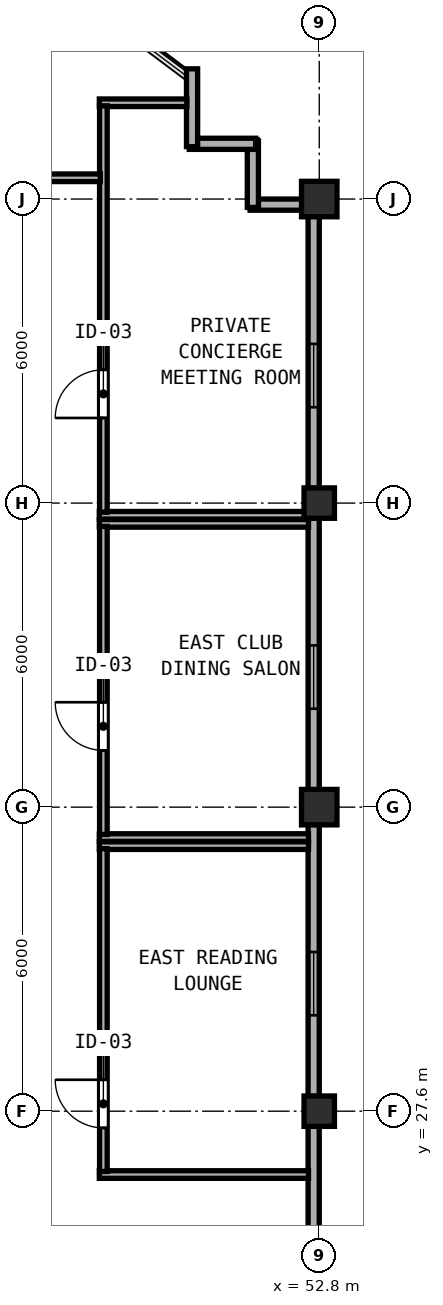
"""IFC4 building model, lengths in metres.
Left out: names, types, materials, properties, quantities, classifications, styles, units other than length and angle.
Written with IfcOpenShell. Run it as: python <this file> out.ifc"""

import sys

from ifc_helpers import new_model, si_unit, direction, frame, frame_2d, origin, origin_2d, place, context, subcontext, project, spatial, rectangle, hollow_rectangle, extrude, element, fill, save


model = new_model("IFC4")
c1 = context("Model", 3, precision=1e-05, world=origin(), true_north=direction((0.0, 1.0)))
c2 = subcontext(c1, "Body", "Model", "MODEL_VIEW")
j1 = project(units=[si_unit("LENGTHUNIT", "METRE"), si_unit("PLANEANGLEUNIT", "RADIAN")], contexts=[c1])
p1 = place(None, origin())
s1 = spatial("IfcSite", under=j1, at=p1, CompositionType="ELEMENT")
p2 = place(p1, origin())
s2 = spatial("IfcBuilding", under=s1, at=p2, CompositionType="ELEMENT")
p3 = place(p2, frame((0.0, 0.0, 282.2)))
s3 = spatial("IfcBuildingStorey", under=s2, at=p3, CompositionType="ELEMENT", Elevation=282.2)
for number, where, z_axis, x_axis in (
    (1, (52.8, 33.6, 0.0), (0.0, 0.0, 1.0), (1.0, 0.0, 0.0)),
    (2, (52.8, 45.6, 0.0), (0.0, 0.0, 1.0), (1.0, 0.0, 0.0)),
):
    element("IfcColumn", number, at=place(p3, frame(where, z_axis=z_axis, x_axis=x_axis)), inside=s3, PredefinedType="COLUMN", context=c2, shape_type="SweptSolid", body=[
        extrude(hollow_rectangle(XDim=0.7, YDim=0.7, WallThickness=0.026, at=origin_2d()), origin(), (0.0, 0.0, 1.0), 3.9),
    ])
for number, where, z_axis, x_axis in (
    (3, (52.8, 27.6, 0.0), (0.0, 0.0, 1.0), (1.0, 0.0, 0.0)),
    (4, (52.8, 39.6, 0.0), (0.0, 0.0, 1.0), (1.0, 0.0, 0.0)),
):
    element("IfcColumn", number, at=place(p3, frame(where, z_axis=z_axis, x_axis=x_axis)), inside=s3, PredefinedType="COLUMN", context=c2, shape_type="SweptSolid", body=[
        extrude(hollow_rectangle(XDim=0.6, YDim=0.6, WallThickness=0.024, at=origin_2d()), origin(), (0.0, 0.0, 1.0), 3.9),
    ])
p4 = place(p3, frame((52.69, 21.942, 0.0), z_axis=(0.0, 0.0, 1.0), x_axis=(0.0, 1.0, 0.0)))
e5 = element("IfcWall", 5, at=p4, inside=s3, PredefinedType="SOLIDWALL", context=c2, shape_type="SweptSolid", body=[
    extrude(rectangle(XDim=5.366, YDim=0.22, at=frame_2d((2.683, 0.0))), origin(), (0.0, 0.0, 1.0), 3.365),
])
p5 = place(p4, frame((0.853, 0.0, 0.85)))
e6 = element("IfcOpeningElement", 6, at=p5, cuts=e5, PredefinedType="OPENING", context=c2, shape_type="SweptSolid", body=[
    extrude(rectangle(XDim=1.25, YDim=1.95, at=frame_2d((0.625, 0.975))), frame((0.0, 0.12, 0.0), z_axis=(0.0, -1.0, 0.0), x_axis=(1.0, 0.0, 0.0)), (0.0, 0.0, 1.0), 0.24),
])
p6 = place(p3, frame((52.69, 27.892, 0.0), z_axis=(0.0, 0.0, 1.0), x_axis=(0.0, 1.0, 0.0)))
e7 = element("IfcWall", 7, at=p6, inside=s3, PredefinedType="SOLIDWALL", context=c2, shape_type="SweptSolid", body=[
    extrude(rectangle(XDim=5.366, YDim=0.22, at=frame_2d((2.683, 0.0))), origin(), (0.0, 0.0, 1.0), 3.365),
])
p7 = place(p6, frame((1.6, 0.0, 0.85)))
e8 = element("IfcOpeningElement", 8, at=p7, cuts=e7, PredefinedType="OPENING", context=c2, shape_type="SweptSolid", body=[
    extrude(rectangle(XDim=1.25, YDim=1.95, at=frame_2d((0.625, 0.975))), frame((0.0, 0.12, 0.0), z_axis=(0.0, -1.0, 0.0), x_axis=(1.0, 0.0, 0.0)), (0.0, 0.0, 1.0), 0.24),
])
p8 = place(p3, frame((52.69, 33.942, 0.0), z_axis=(0.0, 0.0, 1.0), x_axis=(0.0, 1.0, 0.0)))
e9 = element("IfcWall", 9, at=p8, inside=s3, PredefinedType="SOLIDWALL", context=c2, shape_type="SweptSolid", body=[
    extrude(rectangle(XDim=5.366, YDim=0.22, at=frame_2d((2.683, 0.0))), origin(), (0.0, 0.0, 1.0), 3.365),
])
p9 = place(p8, frame((1.6, 0.0, 0.85)))
e10 = element("IfcOpeningElement", 10, at=p9, cuts=e9, PredefinedType="OPENING", context=c2, shape_type="SweptSolid", body=[
    extrude(rectangle(XDim=1.25, YDim=1.95, at=frame_2d((0.625, 0.975))), frame((0.0, 0.12, 0.0), z_axis=(0.0, -1.0, 0.0), x_axis=(1.0, 0.0, 0.0)), (0.0, 0.0, 1.0), 0.24),
])
p10 = place(p3, frame((52.69, 39.892, 0.0), z_axis=(0.0, 0.0, 1.0), x_axis=(0.0, 1.0, 0.0)))
e11 = element("IfcWall", 11, at=p10, inside=s3, PredefinedType="SOLIDWALL", context=c2, shape_type="SweptSolid", body=[
    extrude(rectangle(XDim=5.366, YDim=0.22, at=frame_2d((2.683, 0.0))), origin(), (0.0, 0.0, 1.0), 3.365),
])
p11 = place(p10, frame((1.6, 0.0, 0.85)))
e12 = element("IfcOpeningElement", 12, at=p11, cuts=e11, PredefinedType="OPENING", context=c2, shape_type="SweptSolid", body=[
    extrude(rectangle(XDim=1.25, YDim=1.95, at=frame_2d((0.625, 0.975))), frame((0.0, 0.12, 0.0), z_axis=(0.0, -1.0, 0.0), x_axis=(1.0, 0.0, 0.0)), (0.0, 0.0, 1.0), 0.24),
])
p12 = place(p3, frame((52.458, 45.49, 0.0), z_axis=(0.0, 0.0, 1.0), x_axis=(-1.0, 0.0, 0.0)))
e13 = element("IfcWall", 13, at=p12, inside=s3, PredefinedType="SOLIDWALL", context=c2, shape_type="SweptSolid", body=[
    extrude(rectangle(XDim=1.023, YDim=0.22, at=frame_2d((0.511, 0.0))), origin(), (0.0, 0.0, 1.0), 3.72),
])
p13 = place(p3, frame((51.49, 45.435, 0.0), z_axis=(0.0, 0.0, 1.0), x_axis=(0.0, 1.0, 0.0)))
e14 = element("IfcWall", 14, at=p13, inside=s3, PredefinedType="SOLIDWALL", context=c2, shape_type="SweptSolid", body=[
    extrude(rectangle(XDim=1.31, YDim=0.22, at=frame_2d((0.655, 0.0))), origin(), (0.0, 0.0, 1.0), 3.72),
])
p14 = place(p3, frame((51.545, 46.69, 0.0), z_axis=(0.0, 0.0, 1.0), x_axis=(-1.0, 0.0, 0.0)))
e15 = element("IfcWall", 15, at=p14, inside=s3, PredefinedType="SOLIDWALL", context=c2, shape_type="SweptSolid", body=[
    extrude(rectangle(XDim=1.31, YDim=0.22, at=frame_2d((0.655, 0.0))), origin(), (0.0, 0.0, 1.0), 3.72),
])
p15 = place(p3, frame((50.29, 46.635, 0.0), z_axis=(0.0, 0.0, 1.0), x_axis=(0.0, 1.0, 0.0)))
e16 = element("IfcWall", 16, at=p15, inside=s3, PredefinedType="SOLIDWALL", context=c2, shape_type="SweptSolid", body=[
    extrude(rectangle(XDim=1.535, YDim=0.22, at=frame_2d((0.768, 0.0))), origin(), (0.0, 0.0, 1.0), 3.72),
])
for number, where, z_axis, x_axis in (
    (17, (48.46, 39.2, 0.0), (0.0, 0.0, 1.0), (1.0, 0.0, 0.0)),
    (18, (48.46, 33.0, 0.0), (0.0, 0.0, 1.0), (1.0, 0.0, 0.0)),
):
    element("IfcWall", number, at=place(p3, frame(where, z_axis=z_axis, x_axis=x_axis)), inside=s3, PredefinedType="PARTITIONING", context=c2, shape_type="SweptSolid", body=[
        extrude(rectangle(XDim=4.128, YDim=0.15, at=frame_2d((2.064, 0.0))), origin(), (0.0, 0.0, 1.0), 3.72),
    ])
p16 = place(p3, frame((48.54, 33.06, 0.0), z_axis=(0.0, 0.0, 1.0), x_axis=(0.0, 1.0, 0.0)))
e19 = element("IfcWall", 19, at=p16, inside=s3, PredefinedType="PARTITIONING", context=c2, shape_type="SweptSolid", body=[
    extrude(rectangle(XDim=6.08, YDim=0.15, at=frame_2d((3.04, 0.0))), origin(), (0.0, 0.0, 1.0), 3.72),
])
p17 = place(p16, frame((1.66, 0.0, 0.0)))
e20 = element("IfcOpeningElement", 20, at=p17, cuts=e19, PredefinedType="OPENING", context=c2, shape_type="SweptSolid", body=[
    extrude(rectangle(XDim=0.95, YDim=2.12, at=frame_2d((0.475, 1.06))), frame((0.0, 0.085, 0.0), z_axis=(0.0, -1.0, 0.0), x_axis=(1.0, 0.0, 0.0)), (0.0, 0.0, 1.0), 0.17),
])
p18 = place(p3, frame((48.46, 47.5, 0.0), z_axis=(0.0, 0.0, 1.0), x_axis=(1.0, 0.0, 0.0)))
e21 = element("IfcWall", 21, at=p18, inside=s3, PredefinedType="PARTITIONING", context=c2, shape_type="SweptSolid", body=[
    extrude(rectangle(XDim=1.728, YDim=0.15, at=frame_2d((0.864, 0.0))), origin(), (0.0, 0.0, 1.0), 3.72),
])
p19 = place(p3, frame((48.46, 39.36, 0.0), z_axis=(0.0, 0.0, 1.0), x_axis=(1.0, 0.0, 0.0)))
e22 = element("IfcWall", 22, at=p19, inside=s3, PredefinedType="PARTITIONING", context=c2, shape_type="SweptSolid", body=[
    extrude(rectangle(XDim=4.128, YDim=0.15, at=frame_2d((2.064, 0.0))), origin(), (0.0, 0.0, 1.0), 3.72),
])
p20 = place(p3, frame((48.54, 39.42, 0.0), z_axis=(0.0, 0.0, 1.0), x_axis=(0.0, 1.0, 0.0)))
e23 = element("IfcWall", 23, at=p20, inside=s3, PredefinedType="PARTITIONING", context=c2, shape_type="SweptSolid", body=[
    extrude(rectangle(XDim=8.02, YDim=0.15, at=frame_2d((4.01, 0.0))), origin(), (0.0, 0.0, 1.0), 3.72),
])
p21 = place(p20, frame((1.86, 0.0, 0.0)))
e24 = element("IfcOpeningElement", 24, at=p21, cuts=e23, PredefinedType="OPENING", context=c2, shape_type="SweptSolid", body=[
    extrude(rectangle(XDim=0.95, YDim=2.12, at=frame_2d((0.475, 1.06))), frame((0.0, 0.085, 0.0), z_axis=(0.0, -1.0, 0.0), x_axis=(1.0, 0.0, 0.0)), (0.0, 0.0, 1.0), 0.17),
])
for number, where, z_axis, x_axis in (
    (25, (48.46, 32.84, 0.0), (0.0, 0.0, 1.0), (1.0, 0.0, 0.0)),
    (26, (48.46, 26.35, 0.0), (0.0, 0.0, 1.0), (1.0, 0.0, 0.0)),
):
    element("IfcWall", number, at=place(p3, frame(where, z_axis=z_axis, x_axis=x_axis)), inside=s3, PredefinedType="PARTITIONING", context=c2, shape_type="SweptSolid", body=[
        extrude(rectangle(XDim=4.128, YDim=0.15, at=frame_2d((2.064, 0.0))), origin(), (0.0, 0.0, 1.0), 3.72),
    ])
p22 = place(p3, frame((48.54, 26.41, 0.0), z_axis=(0.0, 0.0, 1.0), x_axis=(0.0, 1.0, 0.0)))
e27 = element("IfcWall", 27, at=p22, inside=s3, PredefinedType="PARTITIONING", context=c2, shape_type="SweptSolid", body=[
    extrude(rectangle(XDim=6.37, YDim=0.15, at=frame_2d((3.185, 0.0))), origin(), (0.0, 0.0, 1.0), 3.72),
])
p23 = place(p22, frame((0.86, 0.0, 0.0)))
e28 = element("IfcOpeningElement", 28, at=p23, cuts=e27, PredefinedType="OPENING", context=c2, shape_type="SweptSolid", body=[
    extrude(rectangle(XDim=0.95, YDim=2.12, at=frame_2d((0.475, 1.06))), frame((0.0, 0.085, 0.0), z_axis=(0.0, -1.0, 0.0), x_axis=(1.0, 0.0, 0.0)), (0.0, 0.0, 1.0), 0.17),
])
p24 = place(p3, frame((45.385, 46.02, 0.0), z_axis=(0.0, 0.0, 1.0), x_axis=(1.0, 0.0, 0.0)))
e29 = element("IfcWall", 29, at=p24, inside=s3, PredefinedType="PARTITIONING", context=c2, shape_type="SweptSolid", body=[
    extrude(rectangle(XDim=3.095, YDim=0.15, at=frame_2d((1.547, 0.0))), origin(), (0.0, 0.0, 1.0), 3.72),
])
p25 = place(p24, frame((0.14, 0.0, 0.0)))
e30 = element("IfcOpeningElement", 30, at=p25, cuts=e29, PredefinedType="OPENING", context=c2, shape_type="SweptSolid", body=[
    extrude(rectangle(XDim=0.95, YDim=2.15, at=frame_2d((0.475, 1.075))), frame((0.0, 0.085, 0.0), z_axis=(0.0, -1.0, 0.0), x_axis=(1.0, 0.0, 0.0)), (0.0, 0.0, 1.0), 0.17),
])
p26 = place(p7, origin())
e31 = element("IfcWindow", 31, at=p26, inside=s3, PartitioningType="SINGLE_PANEL", PredefinedType="WINDOW", context=c2, shape_type="SweptSolid", body=[
    extrude(rectangle(XDim=1.25, YDim=1.95, at=frame_2d((0.625, 0.975))), frame((0.0, 0.03, 0.0), z_axis=(0.0, -1.0, 0.0), x_axis=(1.0, 0.0, 0.0)), (0.0, 0.0, 1.0), 0.06),
])
fill(e8, e31)
p27 = place(p9, origin())
e32 = element("IfcWindow", 32, at=p27, inside=s3, PartitioningType="SINGLE_PANEL", PredefinedType="WINDOW", context=c2, shape_type="SweptSolid", body=[
    extrude(rectangle(XDim=1.25, YDim=1.95, at=frame_2d((0.625, 0.975))), frame((0.0, 0.03, 0.0), z_axis=(0.0, -1.0, 0.0), x_axis=(1.0, 0.0, 0.0)), (0.0, 0.0, 1.0), 0.06),
])
fill(e10, e32)
p28 = place(p11, origin())
e33 = element("IfcWindow", 33, at=p28, inside=s3, PartitioningType="SINGLE_PANEL", PredefinedType="WINDOW", context=c2, shape_type="SweptSolid", body=[
    extrude(rectangle(XDim=1.25, YDim=1.95, at=frame_2d((0.625, 0.975))), frame((0.0, 0.03, 0.0), z_axis=(0.0, -1.0, 0.0), x_axis=(1.0, 0.0, 0.0)), (0.0, 0.0, 1.0), 0.06),
])
fill(e12, e33)
p29 = place(p17, origin())
e34 = element("IfcDoor", 34, at=p29, inside=s3, OperationType="SINGLE_SWING_RIGHT", PredefinedType="DOOR", context=c2, shape_type="SweptSolid", body=[
    extrude(rectangle(XDim=0.95, YDim=2.12, at=frame_2d((0.475, 1.06))), frame((0.0, 0.025, 0.0), z_axis=(0.0, -1.0, 0.0), x_axis=(1.0, 0.0, 0.0)), (0.0, 0.0, 1.0), 0.05),
])
fill(e20, e34)
p30 = place(p21, origin())
e35 = element("IfcDoor", 35, at=p30, inside=s3, OperationType="SINGLE_SWING_LEFT", PredefinedType="DOOR", context=c2, shape_type="SweptSolid", body=[
    extrude(rectangle(XDim=0.95, YDim=2.12, at=frame_2d((0.475, 1.06))), frame((0.0, 0.025, 0.0), z_axis=(0.0, -1.0, 0.0), x_axis=(1.0, 0.0, 0.0)), (0.0, 0.0, 1.0), 0.05),
])
fill(e24, e35)
p31 = place(p23, origin())
e36 = element("IfcDoor", 36, at=p31, inside=s3, OperationType="SINGLE_SWING_RIGHT", PredefinedType="DOOR", context=c2, shape_type="SweptSolid", body=[
    extrude(rectangle(XDim=0.95, YDim=2.12, at=frame_2d((0.475, 1.06))), frame((0.0, 0.025, 0.0), z_axis=(0.0, -1.0, 0.0), x_axis=(1.0, 0.0, 0.0)), (0.0, 0.0, 1.0), 0.05),
])
fill(e28, e36)
save(model, sys.argv[1])
